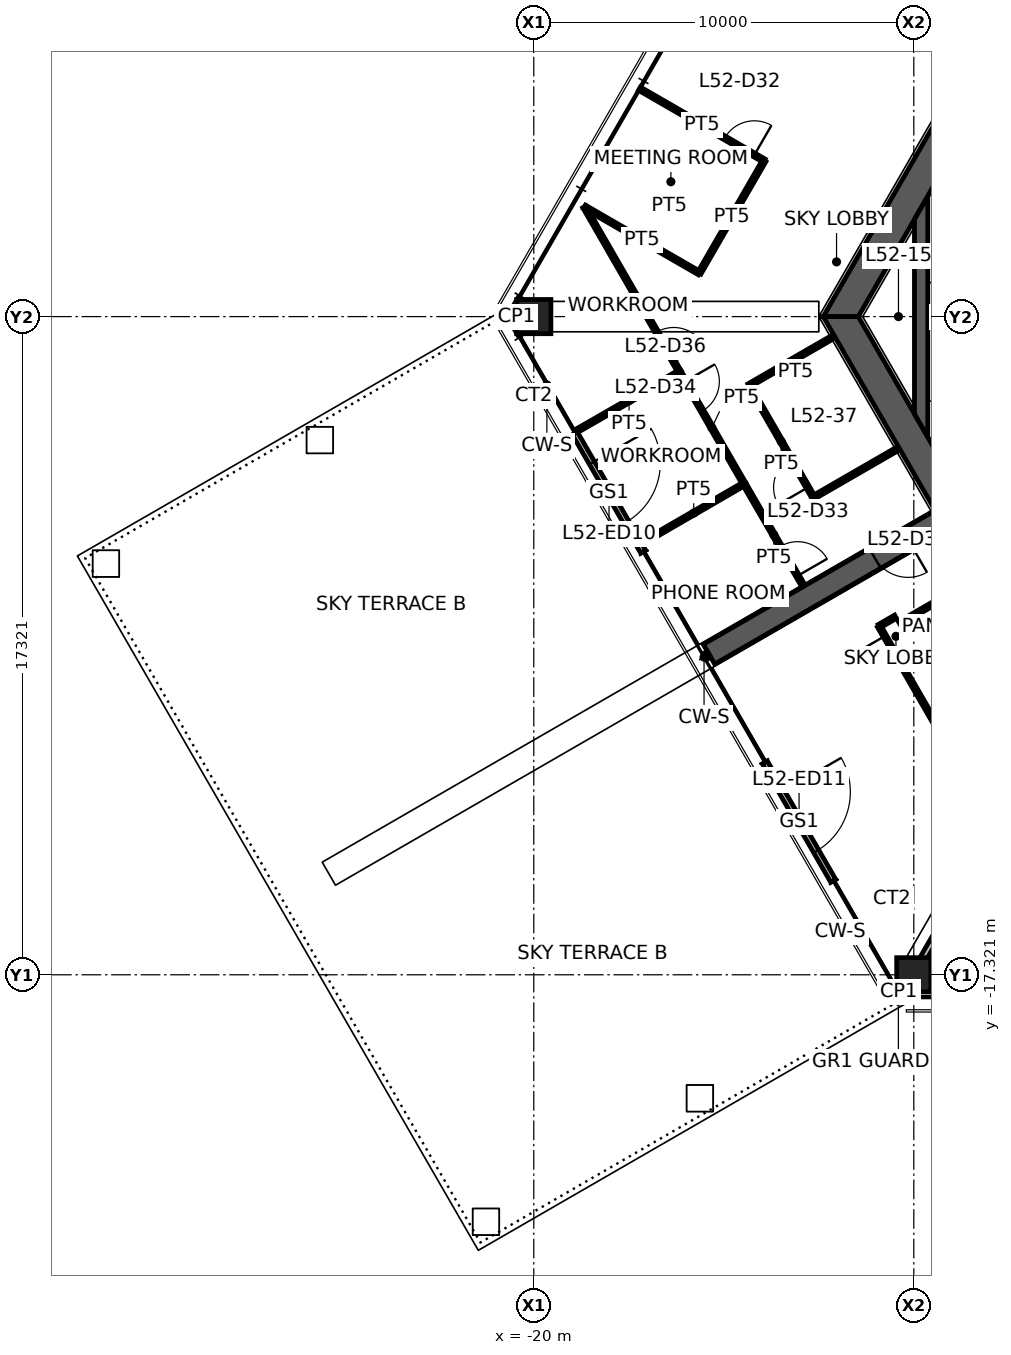
"""IFC4 building model, lengths in metres.
Left out: names, types, materials, properties, quantities, classifications, styles, units other than length and angle.
Written with IfcOpenShell. Run it as: python <this file> out.ifc"""

import sys

from ifc_helpers import new_model, si_unit, direction, frame, frame_2d, origin, origin_2d, place, context, subcontext, project, spatial, polyline, rectangle, hollow_rectangle, outline, extrude, element, fill, save


model = new_model("IFC4")
c1 = context("Model", 3, precision=1e-05, world=origin(), true_north=direction((0.0, 1.0)))
c2 = subcontext(c1, "Body", "Model", "MODEL_VIEW")
j1 = project(units=[si_unit("LENGTHUNIT", "METRE"), si_unit("PLANEANGLEUNIT", "RADIAN")], contexts=[c1])
p1 = place(None, origin())
s1 = spatial("IfcSite", under=j1, at=p1, CompositionType="ELEMENT")
p2 = place(p1, origin())
s2 = spatial("IfcBuilding", under=s1, at=p2, CompositionType="ELEMENT")
p3 = place(p2, frame((0.0, 0.0, 208.3)))
s3 = spatial("IfcBuildingStorey", under=s2, at=p3, CompositionType="ELEMENT", Elevation=208.3)
for number, where, z_axis, x_axis in (
    (1, (-20.0, 0.0, 0.0), (0.0, 0.0, 1.0), (1.0, 0.0, 0.0)),
    (2, (-10.0, -17.321, 0.0), (0.0, 0.0, 1.0), (1.0, 0.0, 0.0)),
):
    element("IfcColumn", number, at=place(p3, frame(where, z_axis=z_axis, x_axis=x_axis)), inside=s3, PredefinedType="COLUMN", context=c2, shape_type="SweptSolid", body=[
        extrude(hollow_rectangle(XDim=0.9, YDim=0.9, WallThickness=0.09, at=origin_2d()), origin(), (0.0, 0.0, 1.0), 4.5),
    ])
p4 = place(p3, frame((-5.961, 10.325, 0.0), z_axis=(0.0, 0.0, 1.0), x_axis=(-0.500004296715, -0.866022923061, 0.0)))
e3 = element("IfcWall", 3, at=p4, inside=s3, PredefinedType="SHEAR", context=c2, shape_type="SweptSolid", body=[
    extrude(outline(polyline([(-0.231, -0.4), (4.494, -0.4), (5.494, -0.4), (12.153, -0.4), (11.691, 0.4), (5.494, 0.4), (4.494, 0.4), (0.231, 0.4), (-0.231, -0.4)])), origin(), (0.0, 0.0, 1.0), 4.5),
])
p5 = place(p4, frame((4.494, 0.0, 0.0)))
e4 = element("IfcOpeningElement", 4, at=p5, cuts=e3, PredefinedType="OPENING", context=c2, shape_type="SweptSolid", body=[
    extrude(rectangle(XDim=1.0, YDim=2.1, at=frame_2d((0.5, 1.05))), frame((0.0, 0.41, 0.0), z_axis=(0.0, -1.0, 0.0), x_axis=(1.0, 0.0, 0.0)), (0.0, 0.0, 1.0), 0.82),
])
p6 = place(p3, frame((-11.922, 0.0, 0.0), z_axis=(0.0, 0.0, 1.0), x_axis=(0.500004296715, -0.866022923061, 0.0)))
e5 = element("IfcWall", 5, at=p6, inside=s3, PredefinedType="SHEAR", context=c2, shape_type="SweptSolid", body=[
    extrude(outline(polyline([(-0.231, -0.4), (6.281, -0.4), (7.081, -0.4), (12.153, -0.4), (11.691, 0.4), (7.081, 0.4), (6.281, 0.4), (0.231, 0.4), (-0.231, -0.4)])), origin(), (0.0, 0.0, 1.0), 4.5),
])
p7 = place(p6, frame((6.281, 0.0, 0.0)))
e6 = element("IfcOpeningElement", 6, at=p7, cuts=e5, PredefinedType="OPENING", context=c2, shape_type="SweptSolid", body=[
    extrude(rectangle(XDim=0.8, YDim=2.1, at=frame_2d((0.4, 1.05))), frame((0.0, 0.41, 0.0), z_axis=(0.0, -1.0, 0.0), x_axis=(1.0, 0.0, 0.0)), (0.0, 0.0, 1.0), 0.82),
])
p8 = place(p3, frame((-9.288, -5.363, 0.0), z_axis=(0.0, 0.0, 1.0), x_axis=(-0.866027473358, -0.499996415376, 0.0)))
e7 = element("IfcWall", 7, at=p8, inside=s3, PredefinedType="SHEAR", context=c2, shape_type="SweptSolid", body=[
    extrude(rectangle(XDim=7.045, YDim=0.6, at=frame_2d((3.523, 0.0))), origin(), (0.0, 0.0, 1.0), 4.5),
])
p9 = place(p8, frame((1.0, 0.0, 0.0)))
e8 = element("IfcOpeningElement", 8, at=p9, cuts=e7, PredefinedType="OPENING", context=c2, shape_type="SweptSolid", body=[
    extrude(rectangle(XDim=1.0, YDim=2.1, at=frame_2d((0.5, 1.05))), frame((0.0, 0.31, 0.0), z_axis=(0.0, -1.0, 0.0), x_axis=(1.0, 0.0, 0.0)), (0.0, 0.0, 1.0), 0.62),
])
p10 = place(p3, frame((-18.92, -3.071, 0.0), z_axis=(0.0, 0.0, 1.0), x_axis=(0.500012057535, -0.866018442252, 0.0)))
e9 = element("IfcWall", 9, at=p10, inside=s3, PredefinedType="STANDARD", context=c2, shape_type="SweptSolid", body=[
    extrude(rectangle(XDim=3.6, YDim=0.15, at=frame_2d((1.8, 0.0))), origin(), (0.0, 0.0, 1.0), 4.5),
])
p11 = place(p10, frame((0.9, 0.0, 0.0)))
e10 = element("IfcOpeningElement", 10, at=p11, cuts=e9, PredefinedType="OPENING", context=c2, shape_type="SweptSolid", body=[
    extrude(rectangle(XDim=1.8, YDim=2.1, at=frame_2d((0.9, 1.05))), frame((0.0, 0.085, 0.0), z_axis=(0.0, -1.0, 0.0), x_axis=(1.0, 0.0, 0.0)), (0.0, 0.0, 1.0), 0.17),
])
p12 = place(p3, frame((-13.92, -11.731, 0.0), z_axis=(0.0, 0.0, 1.0), x_axis=(0.500012057535, -0.866018442252, 0.0)))
e11 = element("IfcWall", 11, at=p12, inside=s3, PredefinedType="STANDARD", context=c2, shape_type="SweptSolid", body=[
    extrude(rectangle(XDim=3.6, YDim=0.15, at=frame_2d((1.8, 0.0))), origin(), (0.0, 0.0, 1.0), 4.5),
])
p13 = place(p12, frame((0.9, 0.0, 0.0)))
e12 = element("IfcOpeningElement", 12, at=p13, cuts=e11, PredefinedType="OPENING", context=c2, shape_type="SweptSolid", body=[
    extrude(rectangle(XDim=1.8, YDim=2.1, at=frame_2d((0.9, 1.05))), frame((0.0, 0.085, 0.0), z_axis=(0.0, -1.0, 0.0), x_axis=(1.0, 0.0, 0.0)), (0.0, 0.0, 1.0), 0.17),
])
p14 = place(p3, frame((-9.808, -2.862, 0.0), z_axis=(0.0, 0.0, 1.0), x_axis=(0.0, 1.0, 0.0)))
e13 = element("IfcWall", 13, at=p14, inside=s3, PredefinedType="SHEAR", context=c2, shape_type="SweptSolid", body=[
    extrude(outline(polyline([(-0.303, -0.175), (6.028, -0.175), (5.421, 0.175), (0.303, 0.175), (-0.303, -0.175)])), origin(), (0.0, 0.0, 1.0), 4.5),
])
p15 = place(p3, frame((-6.035, -10.453, 0.0), z_axis=(0.0, 0.0, 1.0), x_axis=(-0.499989830942, -0.866031274813, 0.0)))
e14 = element("IfcWall", 14, at=p15, inside=s3, PredefinedType="PARTITIONING", context=c2, shape_type="SweptSolid", body=[
    extrude(rectangle(XDim=7.93, YDim=0.175, at=frame_2d((3.965, 0.0))), origin(), (0.0, 0.0, 1.0), 3.65),
])
p16 = place(p15, frame((1.13, 0.0, 0.0)))
e15 = element("IfcOpeningElement", 15, at=p16, cuts=e14, PredefinedType="OPENING", context=c2, shape_type="SweptSolid", body=[
    extrude(rectangle(XDim=1.0, YDim=2.1, at=frame_2d((0.5, 1.05))), frame((0.0, 0.098, 0.0), z_axis=(0.0, -1.0, 0.0), x_axis=(1.0, 0.0, 0.0)), (0.0, 0.0, 1.0), 0.195),
])
p17 = place(p3, frame((-17.219, 5.997, 0.0), z_axis=(0.0, 0.0, 1.0), x_axis=(0.86602253128, -0.50000497529, 0.0)))
e16 = element("IfcWall", 16, at=p17, inside=s3, PredefinedType="PARTITIONING", context=c2, shape_type="SweptSolid", body=[
    extrude(rectangle(XDim=3.79, YDim=0.1, at=frame_2d((1.895, 0.0))), origin(), (0.0, 0.0, 1.0), 3.55),
])
p18 = place(p17, frame((2.59, 0.0, 0.0)))
e17 = element("IfcOpeningElement", 17, at=p18, cuts=e16, PredefinedType="OPENING", context=c2, shape_type="SweptSolid", body=[
    extrude(rectangle(XDim=0.9, YDim=2.1, at=frame_2d((0.45, 1.05))), frame((0.0, 0.06, 0.0), z_axis=(0.0, -1.0, 0.0), x_axis=(1.0, 0.0, 0.0)), (0.0, 0.0, 1.0), 0.12),
])
p19 = place(p3, frame((-15.644, 1.145, 0.0), z_axis=(0.0, 0.0, 1.0), x_axis=(-0.86603534831, 0.499982775181, 0.0)))
e18 = element("IfcWall", 18, at=p19, inside=s3, PredefinedType="PARTITIONING", context=c2, shape_type="SweptSolid", body=[
    extrude(rectangle(XDim=3.491, YDim=0.1, at=frame_2d((1.745, 0.0))), origin(), (0.0, 0.0, 1.0), 3.55),
])
p20 = place(p3, frame((-13.937, 4.102, 0.0), z_axis=(0.0, 0.0, 1.0), x_axis=(-0.500021524473, -0.866012976267, 0.0)))
e19 = element("IfcWall", 19, at=p20, inside=s3, PredefinedType="PARTITIONING", context=c2, shape_type="SweptSolid", body=[
    extrude(rectangle(XDim=3.415, YDim=0.1, at=frame_2d((1.708, 0.0))), origin(), (0.0, 0.0, 1.0), 3.55),
])
p21 = place(p3, frame((-14.34, -1.813, 0.0), z_axis=(0.0, 0.0, 1.0), x_axis=(0.866021702275, 0.500006411147, 0.0)))
e20 = element("IfcWall", 20, at=p21, inside=s3, PredefinedType="PARTITIONING", context=c2, shape_type="SweptSolid", body=[
    extrude(rectangle(XDim=2.58, YDim=0.1, at=frame_2d((1.29, 0.0))), origin(), (0.0, 0.0, 1.0), 3.55),
])
p22 = place(p3, frame((-12.64, -4.757, 0.0), z_axis=(0.0, 0.0, 1.0), x_axis=(-0.500008388397, 0.866020560687, 0.0)))
e21 = element("IfcWall", 21, at=p22, inside=s3, PredefinedType="PARTITIONING", context=c2, shape_type="SweptSolid", body=[
    extrude(rectangle(XDim=3.4, YDim=0.1, at=frame_2d((1.7, 0.0))), origin(), (0.0, 0.0, 1.0), 3.55),
])
p23 = place(p22, frame((0.3, 0.0, 0.0)))
e22 = element("IfcOpeningElement", 22, at=p23, cuts=e21, PredefinedType="OPENING", context=c2, shape_type="SweptSolid", body=[
    extrude(rectangle(XDim=0.9, YDim=2.1, at=frame_2d((0.45, 1.05))), frame((0.0, 0.06, 0.0), z_axis=(0.0, -1.0, 0.0), x_axis=(1.0, 0.0, 0.0)), (0.0, 0.0, 1.0), 0.12),
])
p24 = place(p3, frame((-10.406, -3.467, 0.0), z_axis=(0.0, 0.0, 1.0), x_axis=(-0.866062676131, -0.499935436844, 0.0)))
e23 = element("IfcWall", 23, at=p24, inside=s3, PredefinedType="PARTITIONING", context=c2, shape_type="SweptSolid", body=[
    extrude(rectangle(XDim=2.58, YDim=0.1, at=frame_2d((1.29, 0.0))), origin(), (0.0, 0.0, 1.0), 3.55),
])
p25 = place(p3, frame((-14.458, -4.398, 0.0), z_axis=(0.0, 0.0, 1.0), x_axis=(-0.865192832628, -0.501439290811, 0.0)))
e24 = element("IfcWall", 24, at=p25, inside=s3, PredefinedType="PARTITIONING", context=c2, shape_type="SweptSolid", body=[
    extrude(rectangle(XDim=3.08, YDim=0.1, at=frame_2d((1.54, 0.0))), origin(), (0.0, 0.0, 1.0), 3.55),
])
p26 = place(p3, frame((-18.823, -2.979, 0.0), z_axis=(0.0, 0.0, 1.0), x_axis=(0.866820377992, 0.498620529359, 0.0)))
e25 = element("IfcWall", 25, at=p26, inside=s3, PredefinedType="PARTITIONING", context=c2, shape_type="SweptSolid", body=[
    extrude(rectangle(XDim=3.07, YDim=0.1, at=frame_2d((1.535, 0.0))), origin(), (0.0, 0.0, 1.0), 3.55),
])
p27 = place(p3, frame((-16.167, -1.447, 0.0), z_axis=(0.0, 0.0, 1.0), x_axis=(0.499990572262, -0.866030846823, 0.0)))
e26 = element("IfcWall", 26, at=p27, inside=s3, PredefinedType="PARTITIONING", context=c2, shape_type="SweptSolid", body=[
    extrude(rectangle(XDim=3.416, YDim=0.1, at=frame_2d((1.708, 0.0))), origin(), (0.0, 0.0, 1.0), 3.55),
])
p28 = place(p27, frame((0.3, 0.0, 0.0)))
e27 = element("IfcOpeningElement", 27, at=p28, cuts=e26, PredefinedType="OPENING", context=c2, shape_type="SweptSolid", body=[
    extrude(rectangle(XDim=0.9, YDim=2.1, at=frame_2d((0.45, 1.05))), frame((0.0, 0.06, 0.0), z_axis=(0.0, -1.0, 0.0), x_axis=(1.0, 0.0, 0.0)), (0.0, 0.0, 1.0), 0.12),
])
p29 = place(p3, frame((-14.46, -4.405, 0.0), z_axis=(0.0, 0.0, 1.0), x_axis=(0.501235238742, -0.865311062823, 0.0)))
e28 = element("IfcWall", 28, at=p29, inside=s3, PredefinedType="PARTITIONING", context=c2, shape_type="SweptSolid", body=[
    extrude(rectangle(XDim=3.095, YDim=0.1, at=frame_2d((1.548, 0.0))), origin(), (0.0, 0.0, 1.0), 3.55),
])
p30 = place(p29, frame((1.896, 0.0, 0.0)))
e29 = element("IfcOpeningElement", 29, at=p30, cuts=e28, PredefinedType="OPENING", context=c2, shape_type="SweptSolid", body=[
    extrude(rectangle(XDim=0.9, YDim=2.1, at=frame_2d((0.45, 1.05))), frame((0.0, 0.06, 0.0), z_axis=(0.0, -1.0, 0.0), x_axis=(1.0, 0.0, 0.0)), (0.0, 0.0, 1.0), 0.12),
])
p31 = place(p3, frame((-18.667, 2.89, 0.0), z_axis=(0.0, 0.0, 1.0), x_axis=(0.499455006787, -0.866339827202, 0.0)))
e30 = element("IfcWall", 30, at=p31, inside=s3, PredefinedType="PARTITIONING", context=c2, shape_type="SweptSolid", body=[
    extrude(rectangle(XDim=5.005, YDim=0.1, at=frame_2d((2.503, 0.0))), origin(), (0.0, 0.0, 1.0), 3.55),
])
p32 = place(p31, frame((3.806, 0.0, 0.0)))
e31 = element("IfcOpeningElement", 31, at=p32, cuts=e30, PredefinedType="OPENING", context=c2, shape_type="SweptSolid", body=[
    extrude(rectangle(XDim=0.9, YDim=2.1, at=frame_2d((0.45, 1.05))), frame((0.0, 0.06, 0.0), z_axis=(0.0, -1.0, 0.0), x_axis=(1.0, 0.0, 0.0)), (0.0, 0.0, 1.0), 0.12),
])
p33 = place(p3, frame((-10.913, -8.148, 0.0), z_axis=(0.0, 0.0, 1.0), x_axis=(0.866071776036, 0.499919672301, 0.0)))
e32 = element("IfcWall", 32, at=p33, inside=s3, PredefinedType="PARTITIONING", context=c2, shape_type="SweptSolid", body=[
    extrude(rectangle(XDim=0.5, YDim=0.1, at=frame_2d((0.25, 0.0))), origin(), (0.0, 0.0, 1.0), 3.55),
])
p34 = place(p3, frame((-10.38, -8.071, 0.0), z_axis=(0.0, 0.0, 1.0), x_axis=(0.865989903783, 0.500061482766, 0.0)))
e33 = element("IfcWall", 33, at=p34, inside=s3, PredefinedType="PARTITIONING", context=c2, shape_type="SweptSolid", body=[
    extrude(rectangle(XDim=1.6, YDim=0.1, at=frame_2d((0.8, 0.0))), origin(), (0.0, 0.0, 1.0), 3.55),
])
p35 = place(p3, frame((-9.413, -10.746, 0.0), z_axis=(0.0, 0.0, 1.0), x_axis=(-0.50002537861, 0.866010750942, 0.0)))
e34 = element("IfcWall", 34, at=p35, inside=s3, PredefinedType="PARTITIONING", context=c2, shape_type="SweptSolid", body=[
    extrude(rectangle(XDim=3.0, YDim=0.1, at=frame_2d((1.5, 0.0))), origin(), (0.0, 0.0, 1.0), 3.55),
])
p36 = place(p35, frame((1.8, 0.0, 0.0)))
e35 = element("IfcOpeningElement", 35, at=p36, cuts=e34, PredefinedType="OPENING", context=c2, shape_type="SweptSolid", body=[
    extrude(rectangle(XDim=0.9, YDim=2.1, at=frame_2d((0.45, 1.05))), frame((0.0, 0.06, 0.0), z_axis=(0.0, -1.0, 0.0), x_axis=(1.0, 0.0, 0.0)), (0.0, 0.0, 1.0), 0.12),
])
p37 = place(p3, frame((-15.39, -8.885, 0.0), z_axis=(0.0, 0.0, 1.0), x_axis=(-0.866906303058, -0.498471124258, 0.0)))
e36 = element("IfcWall", 36, at=p37, inside=s3, PredefinedType="PARTITIONING", context=c2, shape_type="SweptSolid", body=[
    extrude(rectangle(XDim=0.045, YDim=0.175, at=frame_2d((0.022, 0.0))), origin(), (0.0, 0.0, 1.0), 4.5),
])
p38 = place(p11, origin())
e37 = element("IfcDoor", 37, at=p38, inside=s3, OperationType="DOUBLE_DOOR_SINGLE_SWING", PredefinedType="DOOR", context=c2, shape_type="SweptSolid", body=[
    extrude(rectangle(XDim=1.8, YDim=2.1, at=frame_2d((0.9, 1.05))), frame((0.0, 0.025, 0.0), z_axis=(0.0, -1.0, 0.0), x_axis=(1.0, 0.0, 0.0)), (0.0, 0.0, 1.0), 0.05),
])
fill(e10, e37)
p39 = place(p13, origin())
e38 = element("IfcDoor", 38, at=p39, inside=s3, OperationType="DOUBLE_DOOR_SINGLE_SWING", PredefinedType="DOOR", context=c2, shape_type="SweptSolid", body=[
    extrude(rectangle(XDim=1.8, YDim=2.1, at=frame_2d((0.9, 1.05))), frame((0.0, 0.025, 0.0), z_axis=(0.0, -1.0, 0.0), x_axis=(1.0, 0.0, 0.0)), (0.0, 0.0, 1.0), 0.05),
])
fill(e12, e38)
p40 = place(p9, origin())
e39 = element("IfcDoor", 39, at=p40, inside=s3, OperationType="SINGLE_SWING_LEFT", PredefinedType="DOOR", context=c2, shape_type="SweptSolid", body=[
    extrude(rectangle(XDim=1.0, YDim=2.1, at=frame_2d((0.5, 1.05))), frame((0.0, 0.025, 0.0), z_axis=(0.0, -1.0, 0.0), x_axis=(1.0, 0.0, 0.0)), (0.0, 0.0, 1.0), 0.05),
])
fill(e8, e39)
p41 = place(p18, origin())
e40 = element("IfcDoor", 40, at=p41, inside=s3, OperationType="SINGLE_SWING_RIGHT", PredefinedType="DOOR", context=c2, shape_type="SweptSolid", body=[
    extrude(rectangle(XDim=0.9, YDim=2.1, at=frame_2d((0.45, 1.05))), frame((0.0, 0.025, 0.0), z_axis=(0.0, -1.0, 0.0), x_axis=(1.0, 0.0, 0.0)), (0.0, 0.0, 1.0), 0.05),
])
fill(e17, e40)
p42 = place(p23, origin())
e41 = element("IfcDoor", 41, at=p42, inside=s3, OperationType="SINGLE_SWING_LEFT", PredefinedType="DOOR", context=c2, shape_type="SweptSolid", body=[
    extrude(rectangle(XDim=0.9, YDim=2.1, at=frame_2d((0.45, 1.05))), frame((0.0, 0.025, 0.0), z_axis=(0.0, -1.0, 0.0), x_axis=(1.0, 0.0, 0.0)), (0.0, 0.0, 1.0), 0.05),
])
fill(e22, e41)
p43 = place(p28, origin())
e42 = element("IfcDoor", 42, at=p43, inside=s3, OperationType="SINGLE_SWING_LEFT", PredefinedType="DOOR", context=c2, shape_type="SweptSolid", body=[
    extrude(rectangle(XDim=0.9, YDim=2.1, at=frame_2d((0.45, 1.05))), frame((0.0, 0.025, 0.0), z_axis=(0.0, -1.0, 0.0), x_axis=(1.0, 0.0, 0.0)), (0.0, 0.0, 1.0), 0.05),
])
fill(e27, e42)
p44 = place(p30, origin())
e43 = element("IfcDoor", 43, at=p44, inside=s3, OperationType="SINGLE_SWING_RIGHT", PredefinedType="DOOR", context=c2, shape_type="SweptSolid", body=[
    extrude(rectangle(XDim=0.9, YDim=2.1, at=frame_2d((0.45, 1.05))), frame((0.0, 0.025, 0.0), z_axis=(0.0, -1.0, 0.0), x_axis=(1.0, 0.0, 0.0)), (0.0, 0.0, 1.0), 0.05),
])
fill(e29, e43)
p45 = place(p32, origin())
e44 = element("IfcDoor", 44, at=p45, inside=s3, OperationType="SINGLE_SWING_RIGHT", PredefinedType="DOOR", context=c2, shape_type="SweptSolid", body=[
    extrude(rectangle(XDim=0.9, YDim=2.1, at=frame_2d((0.45, 1.05))), frame((0.0, 0.025, 0.0), z_axis=(0.0, -1.0, 0.0), x_axis=(1.0, 0.0, 0.0)), (0.0, 0.0, 1.0), 0.05),
])
fill(e31, e44)
p46 = place(p36, origin())
e45 = element("IfcDoor", 45, at=p46, inside=s3, OperationType="SINGLE_SWING_RIGHT", PredefinedType="DOOR", context=c2, shape_type="SweptSolid", body=[
    extrude(rectangle(XDim=0.9, YDim=2.1, at=frame_2d((0.45, 1.05))), frame((0.0, 0.025, 0.0), z_axis=(0.0, -1.0, 0.0), x_axis=(1.0, 0.0, 0.0)), (0.0, 0.0, 1.0), 0.05),
])
fill(e35, e45)
save(model, sys.argv[1])
